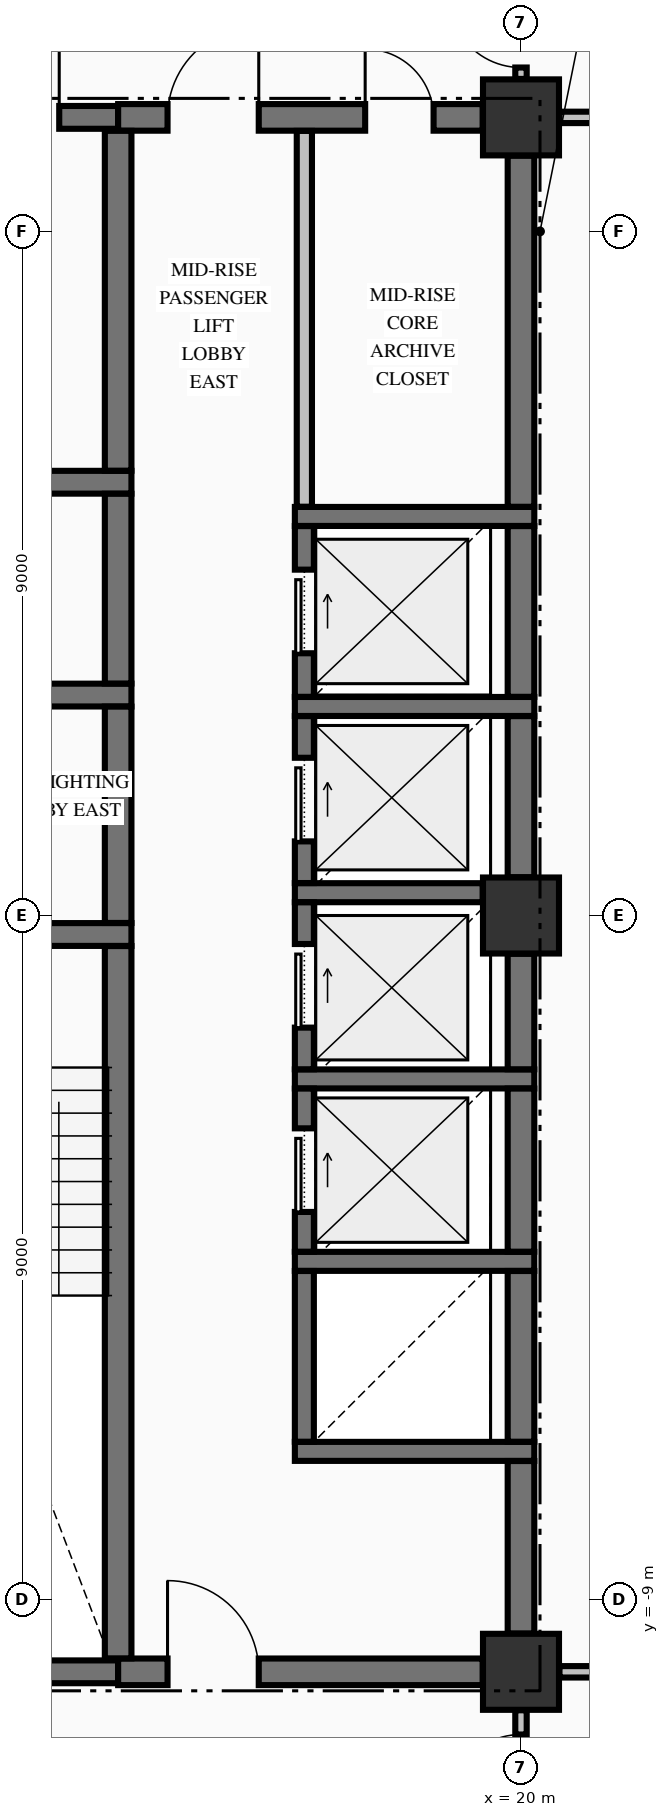
"""IFC4 building model, lengths in metres.
Left out: names, types, materials, properties, quantities, classifications, styles, units other than length and angle.
Written with IfcOpenShell. Run it as: python <this file> out.ifc"""

import sys

from ifc_helpers import new_model, si_unit, direction, frame, frame_2d, origin, origin_2d, place, context, subcontext, project, spatial, rectangle, extrude, element, fill, save


model = new_model("IFC4")
c1 = context("Model", 3, precision=1e-05, world=origin(), true_north=direction((0.0, 1.0)))
c2 = subcontext(c1, "Body", "Model", "MODEL_VIEW")
j1 = project(units=[si_unit("LENGTHUNIT", "METRE"), si_unit("PLANEANGLEUNIT", "RADIAN")], contexts=[c1])
p1 = place(None, origin())
s1 = spatial("IfcSite", under=j1, at=p1, CompositionType="ELEMENT")
p2 = place(p1, origin())
s2 = spatial("IfcBuilding", under=s1, at=p2, CompositionType="ELEMENT")
p3 = place(p2, frame((0.0, 0.0, 91.36)))
s3 = spatial("IfcBuildingStorey", under=s2, at=p3, CompositionType="ELEMENT", Elevation=91.36)
for number, where, z_axis, x_axis in (
    (1, (20.0, -9.95, -0.25), (0.0, 0.0, 1.0), (1.0, 0.0, 0.0)),
    (2, (20.0, 10.5, -0.25), (0.0, 0.0, 1.0), (1.0, 0.0, 0.0)),
    (3, (20.0, 0.0, -0.25), (0.0, 0.0, 1.0), (1.0, 0.0, 0.0)),
):
    element("IfcColumn", number, at=place(p3, frame(where, z_axis=z_axis, x_axis=x_axis)), inside=s3, PredefinedType="COLUMN", context=c2, shape_type="SweptSolid", body=[
        extrude(rectangle(XDim=1.0, YDim=1.0, at=origin_2d()), origin(), (0.0, 0.0, 1.0), 3.57),
    ])
p4 = place(p3, frame((11.504, -9.95, 0.0), z_axis=(0.0, 0.0, 1.0), x_axis=(1.0, 0.0, 0.0)))
e4 = element("IfcWall", 4, at=p4, inside=s3, PredefinedType="SHEAR", context=c2, shape_type="SweptSolid", body=[
    extrude(rectangle(XDim=3.196, YDim=0.3, at=frame_2d((1.598, 0.0))), origin(), (0.0, 0.0, 1.0), 3.32),
])
p5 = place(p3, frame((14.7, -9.95, 0.0), z_axis=(0.0, 0.0, 1.0), x_axis=(1.0, 0.0, 0.0)))
e5 = element("IfcWall", 5, at=p5, inside=s3, PredefinedType="SHEAR", context=c2, shape_type="SweptSolid", body=[
    extrude(rectangle(XDim=4.796, YDim=0.35, at=frame_2d((2.398, 0.0))), origin(), (0.0, 0.0, 1.0), 3.32),
])
p6 = place(p5, frame((0.65, 0.0, 0.0)))
e6 = element("IfcOpeningElement", 6, at=p6, cuts=e5, PredefinedType="OPENING", context=c2, shape_type="SweptSolid", body=[
    extrude(rectangle(XDim=1.2, YDim=2.15, at=frame_2d((0.6, 1.075))), frame((0.0, 0.185, 0.0), z_axis=(0.0, -1.0, 0.0), x_axis=(1.0, 0.0, 0.0)), (0.0, 0.0, 1.0), 0.37),
])
for number, where, z_axis, x_axis in (
    (7, (17.025, -7.05, 0.0), (0.0, 0.0, 1.0), (1.0, 0.0, 0.0)),
    (8, (17.025, -4.55, 0.0), (0.0, 0.0, 1.0), (1.0, 0.0, 0.0)),
    (9, (17.025, -2.15, 0.0), (0.0, 0.0, 1.0), (1.0, 0.0, 0.0)),
):
    element("IfcWall", number, at=place(p3, frame(where, z_axis=z_axis, x_axis=x_axis)), inside=s3, PredefinedType="SOLIDWALL", context=c2, shape_type="SweptSolid", body=[
        extrude(rectangle(XDim=3.15, YDim=0.25, at=frame_2d((1.575, 0.0))), origin(), (0.0, 0.0, 1.0), 3.32),
    ])
p7 = place(p3, frame((11.504, -0.25, 0.0), z_axis=(0.0, 0.0, 1.0), x_axis=(1.0, 0.0, 0.0)))
e10 = element("IfcWall", 10, at=p7, inside=s3, PredefinedType="SHEAR", context=c2, shape_type="SweptSolid", body=[
    extrude(rectangle(XDim=3.371, YDim=0.3, at=frame_2d((1.686, 0.0))), origin(), (0.0, 0.0, 1.0), 3.32),
])
p8 = place(p7, frame((1.096, 0.0, 0.0)))
e11 = element("IfcOpeningElement", 11, at=p8, cuts=e10, PredefinedType="OPENING", context=c2, shape_type="SweptSolid", body=[
    extrude(rectangle(XDim=1.1, YDim=2.15, at=frame_2d((0.55, 1.075))), frame((0.0, 0.16, 0.0), z_axis=(0.0, -1.0, 0.0), x_axis=(1.0, 0.0, 0.0)), (0.0, 0.0, 1.0), 0.32),
])
p9 = place(p3, frame((17.025, 0.3, 0.0), z_axis=(0.0, 0.0, 1.0), x_axis=(1.0, 0.0, 0.0)))
e12 = element("IfcWall", 12, at=p9, inside=s3, PredefinedType="SOLIDWALL", context=c2, shape_type="SweptSolid", body=[
    extrude(rectangle(XDim=2.471, YDim=0.25, at=frame_2d((1.236, 0.0))), origin(), (0.0, 0.0, 1.0), 3.32),
])
p10 = place(p3, frame((17.025, 2.75, 0.0), z_axis=(0.0, 0.0, 1.0), x_axis=(1.0, 0.0, 0.0)))
e13 = element("IfcWall", 13, at=p10, inside=s3, PredefinedType="SOLIDWALL", context=c2, shape_type="SweptSolid", body=[
    extrude(rectangle(XDim=3.15, YDim=0.25, at=frame_2d((1.575, 0.0))), origin(), (0.0, 0.0, 1.0), 3.32),
])
p11 = place(p3, frame((10.85, 2.9, 0.0), z_axis=(0.0, 0.0, 1.0), x_axis=(1.0, 0.0, 0.0)))
e14 = element("IfcWall", 14, at=p11, inside=s3, PredefinedType="SHEAR", context=c2, shape_type="SweptSolid", body=[
    extrude(rectangle(XDim=4.025, YDim=0.3, at=frame_2d((2.012, 0.0))), origin(), (0.0, 0.0, 1.0), 3.32),
])
p12 = place(p11, frame((0.85, 0.0, 0.0)))
e15 = element("IfcOpeningElement", 15, at=p12, cuts=e14, PredefinedType="OPENING", context=c2, shape_type="SweptSolid", body=[
    extrude(rectangle(XDim=1.1, YDim=2.2, at=frame_2d((0.55, 1.1))), frame((0.0, 0.16, 0.0), z_axis=(0.0, -1.0, 0.0), x_axis=(1.0, 0.0, 0.0)), (0.0, 0.0, 1.0), 0.32),
])
p13 = place(p3, frame((17.025, 5.25, 0.0), z_axis=(0.0, 0.0, 1.0), x_axis=(1.0, 0.0, 0.0)))
e16 = element("IfcWall", 16, at=p13, inside=s3, PredefinedType="SOLIDWALL", context=c2, shape_type="SweptSolid", body=[
    extrude(rectangle(XDim=3.15, YDim=0.25, at=frame_2d((1.575, 0.0))), origin(), (0.0, 0.0, 1.0), 3.32),
])
p14 = place(p3, frame((10.85, 5.7, 0.0), z_axis=(0.0, 0.0, 1.0), x_axis=(1.0, 0.0, 0.0)))
e17 = element("IfcWall", 17, at=p14, inside=s3, PredefinedType="SHEAR", context=c2, shape_type="SweptSolid", body=[
    extrude(rectangle(XDim=4.025, YDim=0.3, at=frame_2d((2.012, 0.0))), origin(), (0.0, 0.0, 1.0), 3.32),
])
p15 = place(p3, frame((11.504, 10.5, 0.0), z_axis=(0.0, 0.0, 1.0), x_axis=(1.0, 0.0, 0.0)))
e18 = element("IfcWall", 18, at=p15, inside=s3, PredefinedType="SHEAR", context=c2, shape_type="SweptSolid", body=[
    extrude(rectangle(XDim=3.196, YDim=0.3, at=frame_2d((1.598, 0.0))), origin(), (0.0, 0.0, 1.0), 3.32),
])
p16 = place(p15, frame((1.471, 0.0, 0.0)))
e19 = element("IfcOpeningElement", 19, at=p16, cuts=e18, PredefinedType="OPENING", context=c2, shape_type="SweptSolid", body=[
    extrude(rectangle(XDim=0.95, YDim=2.15, at=frame_2d((0.475, 1.075))), frame((0.0, 0.16, 0.0), z_axis=(0.0, -1.0, 0.0), x_axis=(1.0, 0.0, 0.0)), (0.0, 0.0, 1.0), 0.32),
])
p17 = place(p3, frame((14.7, 10.5, 0.0), z_axis=(0.0, 0.0, 1.0), x_axis=(1.0, 0.0, 0.0)))
e20 = element("IfcWall", 20, at=p17, inside=s3, PredefinedType="SHEAR", context=c2, shape_type="SweptSolid", body=[
    extrude(rectangle(XDim=4.796, YDim=0.35, at=frame_2d((2.398, 0.0))), origin(), (0.0, 0.0, 1.0), 3.32),
])
p18 = place(p17, frame((0.65, 0.0, 0.0)))
e21 = element("IfcOpeningElement", 21, at=p18, cuts=e20, PredefinedType="OPENING", context=c2, shape_type="SweptSolid", body=[
    extrude(rectangle(XDim=1.2, YDim=2.15, at=frame_2d((0.6, 1.075))), frame((0.0, 0.185, 0.0), z_axis=(0.0, -1.0, 0.0), x_axis=(1.0, 0.0, 0.0)), (0.0, 0.0, 1.0), 0.37),
])
p19 = place(p17, frame((3.25, 0.0, 0.0)))
e22 = element("IfcOpeningElement", 22, at=p19, cuts=e20, PredefinedType="OPENING", context=c2, shape_type="SweptSolid", body=[
    extrude(rectangle(XDim=0.9, YDim=2.15, at=frame_2d((0.45, 1.075))), frame((0.0, 0.185, 0.0), z_axis=(0.0, -1.0, 0.0), x_axis=(1.0, 0.0, 0.0)), (0.0, 0.0, 1.0), 0.37),
])
p20 = place(p3, frame((20.506, -9.95, 0.0), z_axis=(0.0, 0.0, 1.0), x_axis=(1.0, 0.0, 0.0)))
e23 = element("IfcWall", 23, at=p20, inside=s3, PredefinedType="PARTITIONING", context=c2, shape_type="SweptSolid", body=[
    extrude(rectangle(XDim=7.329, YDim=0.15, at=frame_2d((3.665, 0.0))), origin(), (0.0, 0.0, 1.0), 3.32),
])
p21 = place(p20, frame((2.994, 0.0, 0.0)))
e24 = element("IfcOpeningElement", 24, at=p21, cuts=e23, PredefinedType="OPENING", context=c2, shape_type="SweptSolid", body=[
    extrude(rectangle(XDim=1.0, YDim=2.15, at=frame_2d((0.5, 1.075))), frame((0.0, 0.085, 0.0), z_axis=(0.0, -1.0, 0.0), x_axis=(1.0, 0.0, 0.0)), (0.0, 0.0, 1.0), 0.17),
])
p22 = place(p3, frame((20.506, 10.5, 0.0), z_axis=(0.0, 0.0, 1.0), x_axis=(1.0, 0.0, 0.0)))
e25 = element("IfcWall", 25, at=p22, inside=s3, PredefinedType="PARTITIONING", context=c2, shape_type="SweptSolid", body=[
    extrude(rectangle(XDim=7.329, YDim=0.15, at=frame_2d((3.665, 0.0))), origin(), (0.0, 0.0, 1.0), 3.32),
])
p23 = place(p22, frame((2.994, 0.0, 0.0)))
e26 = element("IfcOpeningElement", 26, at=p23, cuts=e25, PredefinedType="OPENING", context=c2, shape_type="SweptSolid", body=[
    extrude(rectangle(XDim=1.0, YDim=2.15, at=frame_2d((0.5, 1.075))), frame((0.0, 0.085, 0.0), z_axis=(0.0, -1.0, 0.0), x_axis=(1.0, 0.0, 0.0)), (0.0, 0.0, 1.0), 0.17),
])
p24 = place(p3, frame((14.7, -9.773, 0.0), z_axis=(0.0, 0.0, 1.0), x_axis=(0.0, 1.0, 0.0)))
e27 = element("IfcWall", 27, at=p24, inside=s3, PredefinedType="SHEAR", context=c2, shape_type="SweptSolid", body=[
    extrude(rectangle(XDim=9.371, YDim=0.35, at=frame_2d((4.686, 0.0))), origin(), (0.0, 0.0, 1.0), 3.32),
])
p25 = place(p3, frame((14.7, -0.098, 0.0), z_axis=(0.0, 0.0, 1.0), x_axis=(0.0, 1.0, 0.0)))
e28 = element("IfcWall", 28, at=p25, inside=s3, PredefinedType="SHEAR", context=c2, shape_type="SweptSolid", body=[
    extrude(rectangle(XDim=2.846, YDim=0.35, at=frame_2d((1.423, 0.0))), origin(), (0.0, 0.0, 1.0), 3.32),
])
p26 = place(p3, frame((14.7, 3.052, 0.0), z_axis=(0.0, 0.0, 1.0), x_axis=(0.0, 1.0, 0.0)))
e29 = element("IfcWall", 29, at=p26, inside=s3, PredefinedType="SHEAR", context=c2, shape_type="SweptSolid", body=[
    extrude(rectangle(XDim=2.496, YDim=0.35, at=frame_2d((1.248, 0.0))), origin(), (0.0, 0.0, 1.0), 3.32),
])
p27 = place(p3, frame((14.7, 5.852, 0.0), z_axis=(0.0, 0.0, 1.0), x_axis=(0.0, 1.0, 0.0)))
e30 = element("IfcWall", 30, at=p27, inside=s3, PredefinedType="SHEAR", context=c2, shape_type="SweptSolid", body=[
    extrude(rectangle(XDim=4.471, YDim=0.35, at=frame_2d((2.235, 0.0))), origin(), (0.0, 0.0, 1.0), 3.32),
])
p28 = place(p3, frame((17.15, -6.923, 0.0), z_axis=(0.0, 0.0, 1.0), x_axis=(0.0, 1.0, 0.0)))
e31 = element("IfcWall", 31, at=p28, inside=s3, PredefinedType="SOLIDWALL", context=c2, shape_type="SweptSolid", body=[
    extrude(rectangle(XDim=2.246, YDim=0.25, at=frame_2d((1.123, 0.0))), origin(), (0.0, 0.0, 1.0), 3.32),
])
p29 = place(p3, frame((17.15, -4.423, 0.0), z_axis=(0.0, 0.0, 1.0), x_axis=(0.0, 1.0, 0.0)))
e32 = element("IfcWall", 32, at=p29, inside=s3, PredefinedType="SOLIDWALL", context=c2, shape_type="SweptSolid", body=[
    extrude(rectangle(XDim=2.146, YDim=0.25, at=frame_2d((1.073, 0.0))), origin(), (0.0, 0.0, 1.0), 3.32),
])
p30 = place(p29, frame((0.523, 0.0, 0.0)))
e33 = element("IfcOpeningElement", 33, at=p30, cuts=e32, PredefinedType="OPENING", context=c2, shape_type="SweptSolid", body=[
    extrude(rectangle(XDim=1.1, YDim=2.2, at=frame_2d((0.55, 1.1))), frame((0.0, 0.135, 0.0), z_axis=(0.0, -1.0, 0.0), x_axis=(1.0, 0.0, 0.0)), (0.0, 0.0, 1.0), 0.27),
])
p31 = place(p3, frame((17.15, -2.023, 0.0), z_axis=(0.0, 0.0, 1.0), x_axis=(0.0, 1.0, 0.0)))
e34 = element("IfcWall", 34, at=p31, inside=s3, PredefinedType="SOLIDWALL", context=c2, shape_type="SweptSolid", body=[
    extrude(rectangle(XDim=2.196, YDim=0.25, at=frame_2d((1.098, 0.0))), origin(), (0.0, 0.0, 1.0), 3.32),
])
p32 = place(p31, frame((0.548, 0.0, 0.0)))
e35 = element("IfcOpeningElement", 35, at=p32, cuts=e34, PredefinedType="OPENING", context=c2, shape_type="SweptSolid", body=[
    extrude(rectangle(XDim=1.1, YDim=2.2, at=frame_2d((0.55, 1.1))), frame((0.0, 0.135, 0.0), z_axis=(0.0, -1.0, 0.0), x_axis=(1.0, 0.0, 0.0)), (0.0, 0.0, 1.0), 0.27),
])
p33 = place(p3, frame((17.15, 0.427, 0.0), z_axis=(0.0, 0.0, 1.0), x_axis=(0.0, 1.0, 0.0)))
e36 = element("IfcWall", 36, at=p33, inside=s3, PredefinedType="SOLIDWALL", context=c2, shape_type="SweptSolid", body=[
    extrude(rectangle(XDim=2.196, YDim=0.25, at=frame_2d((1.098, 0.0))), origin(), (0.0, 0.0, 1.0), 3.32),
])
p34 = place(p33, frame((0.548, 0.0, 0.0)))
e37 = element("IfcOpeningElement", 37, at=p34, cuts=e36, PredefinedType="OPENING", context=c2, shape_type="SweptSolid", body=[
    extrude(rectangle(XDim=1.1, YDim=2.2, at=frame_2d((0.55, 1.1))), frame((0.0, 0.135, 0.0), z_axis=(0.0, -1.0, 0.0), x_axis=(1.0, 0.0, 0.0)), (0.0, 0.0, 1.0), 0.27),
])
p35 = place(p3, frame((17.15, 2.877, 0.0), z_axis=(0.0, 0.0, 1.0), x_axis=(0.0, 1.0, 0.0)))
e38 = element("IfcWall", 38, at=p35, inside=s3, PredefinedType="SOLIDWALL", context=c2, shape_type="SweptSolid", body=[
    extrude(rectangle(XDim=2.246, YDim=0.25, at=frame_2d((1.123, 0.0))), origin(), (0.0, 0.0, 1.0), 3.32),
])
p36 = place(p35, frame((0.573, 0.0, 0.0)))
e39 = element("IfcOpeningElement", 39, at=p36, cuts=e38, PredefinedType="OPENING", context=c2, shape_type="SweptSolid", body=[
    extrude(rectangle(XDim=1.1, YDim=2.2, at=frame_2d((0.55, 1.1))), frame((0.0, 0.135, 0.0), z_axis=(0.0, -1.0, 0.0), x_axis=(1.0, 0.0, 0.0)), (0.0, 0.0, 1.0), 0.27),
])
p37 = place(p3, frame((20.0, -9.446, 0.0), z_axis=(0.0, 0.0, 1.0), x_axis=(0.0, 1.0, 0.0)))
e40 = element("IfcWall", 40, at=p37, inside=s3, PredefinedType="SHEAR", context=c2, shape_type="SweptSolid", body=[
    extrude(rectangle(XDim=2.269, YDim=0.35, at=frame_2d((1.135, 0.0))), origin(), (0.0, 0.0, 1.0), 3.32),
])
p38 = place(p3, frame((20.0, -6.923, 0.0), z_axis=(0.0, 0.0, 1.0), x_axis=(0.0, 1.0, 0.0)))
e41 = element("IfcWall", 41, at=p38, inside=s3, PredefinedType="SHEAR", context=c2, shape_type="SweptSolid", body=[
    extrude(rectangle(XDim=2.246, YDim=0.35, at=frame_2d((1.123, 0.0))), origin(), (0.0, 0.0, 1.0), 3.32),
])
p39 = place(p3, frame((20.0, -4.423, 0.0), z_axis=(0.0, 0.0, 1.0), x_axis=(0.0, 1.0, 0.0)))
e42 = element("IfcWall", 42, at=p39, inside=s3, PredefinedType="SHEAR", context=c2, shape_type="SweptSolid", body=[
    extrude(rectangle(XDim=2.146, YDim=0.35, at=frame_2d((1.073, 0.0))), origin(), (0.0, 0.0, 1.0), 3.32),
])
p40 = place(p3, frame((20.0, -2.023, 0.0), z_axis=(0.0, 0.0, 1.0), x_axis=(0.0, 1.0, 0.0)))
e43 = element("IfcWall", 43, at=p40, inside=s3, PredefinedType="SHEAR", context=c2, shape_type="SweptSolid", body=[
    extrude(rectangle(XDim=1.519, YDim=0.35, at=frame_2d((0.76, 0.0))), origin(), (0.0, 0.0, 1.0), 3.32),
])
p41 = place(p3, frame((20.0, 0.504, 0.0), z_axis=(0.0, 0.0, 1.0), x_axis=(0.0, 1.0, 0.0)))
e44 = element("IfcWall", 44, at=p41, inside=s3, PredefinedType="SHEAR", context=c2, shape_type="SweptSolid", body=[
    extrude(rectangle(XDim=2.119, YDim=0.35, at=frame_2d((1.06, 0.0))), origin(), (0.0, 0.0, 1.0), 3.32),
])
p42 = place(p3, frame((20.0, 2.877, 0.0), z_axis=(0.0, 0.0, 1.0), x_axis=(0.0, 1.0, 0.0)))
e45 = element("IfcWall", 45, at=p42, inside=s3, PredefinedType="SHEAR", context=c2, shape_type="SweptSolid", body=[
    extrude(rectangle(XDim=2.246, YDim=0.35, at=frame_2d((1.123, 0.0))), origin(), (0.0, 0.0, 1.0), 3.32),
])
p43 = place(p3, frame((20.0, 5.377, 0.0), z_axis=(0.0, 0.0, 1.0), x_axis=(0.0, 1.0, 0.0)))
e46 = element("IfcWall", 46, at=p43, inside=s3, PredefinedType="SHEAR", context=c2, shape_type="SweptSolid", body=[
    extrude(rectangle(XDim=4.619, YDim=0.35, at=frame_2d((2.31, 0.0))), origin(), (0.0, 0.0, 1.0), 3.32),
])
p44 = place(p3, frame((17.15, 5.378, 0.0), z_axis=(0.0, 0.0, 1.0), x_axis=(0.0, 1.0, 0.0)))
e47 = element("IfcWall", 47, at=p44, inside=s3, PredefinedType="PARTITIONING", context=c2, shape_type="SweptSolid", body=[
    extrude(rectangle(XDim=4.944, YDim=0.2, at=frame_2d((2.472, 0.0))), origin(), (0.0, 0.0, 1.0), 3.32),
])
p45 = place(p3, frame((20.0, -12.472, 0.0), z_axis=(0.0, 0.0, 1.0), x_axis=(0.0, 1.0, 0.0)))
e48 = element("IfcWall", 48, at=p45, inside=s3, PredefinedType="PARTITIONING", context=c2, shape_type="SweptSolid", body=[
    extrude(rectangle(XDim=2.016, YDim=0.15, at=frame_2d((1.008, 0.0))), origin(), (0.0, 0.0, 1.0), 2.81),
])
p46 = place(p45, frame((0.747, 0.0, 0.0)))
e49 = element("IfcOpeningElement", 49, at=p46, cuts=e48, PredefinedType="OPENING", context=c2, shape_type="SweptSolid", body=[
    extrude(rectangle(XDim=0.95, YDim=2.15, at=frame_2d((0.475, 1.075))), frame((0.0, 0.085, 0.0), z_axis=(0.0, -1.0, 0.0), x_axis=(1.0, 0.0, 0.0)), (0.0, 0.0, 1.0), 0.17),
])
p47 = place(p3, frame((20.0, 11.006, 0.0), z_axis=(0.0, 0.0, 1.0), x_axis=(0.0, 1.0, 0.0)))
e50 = element("IfcWall", 50, at=p47, inside=s3, PredefinedType="PARTITIONING", context=c2, shape_type="SweptSolid", body=[
    extrude(rectangle(XDim=1.666, YDim=0.15, at=frame_2d((0.833, 0.0))), origin(), (0.0, 0.0, 1.0), 2.81),
])
p48 = place(p47, frame((0.15, 0.0, 0.0)))
e51 = element("IfcOpeningElement", 51, at=p48, cuts=e50, PredefinedType="OPENING", context=c2, shape_type="SweptSolid", body=[
    extrude(rectangle(XDim=0.95, YDim=2.15, at=frame_2d((0.475, 1.075))), frame((0.0, 0.085, 0.0), z_axis=(0.0, -1.0, 0.0), x_axis=(1.0, 0.0, 0.0)), (0.0, 0.0, 1.0), 0.17),
])
p49 = place(p16, origin())
e52 = element("IfcDoor", 52, at=p49, inside=s3, OperationType="SINGLE_SWING_RIGHT", PredefinedType="DOOR", context=c2, shape_type="SweptSolid", body=[
    extrude(rectangle(XDim=0.95, YDim=2.15, at=frame_2d((0.475, 1.075))), frame((0.0, 0.025, 0.0), z_axis=(0.0, -1.0, 0.0), x_axis=(1.0, 0.0, 0.0)), (0.0, 0.0, 1.0), 0.05),
])
fill(e19, e52)
p50 = place(p30, origin())
e53 = element("IfcDoor", 53, at=p50, inside=s3, OperationType="SLIDING_TO_RIGHT", PredefinedType="DOOR", context=c2, shape_type="SweptSolid", body=[
    extrude(rectangle(XDim=1.1, YDim=2.2, at=frame_2d((0.55, 1.1))), frame((0.0, 0.025, 0.0), z_axis=(0.0, -1.0, 0.0), x_axis=(1.0, 0.0, 0.0)), (0.0, 0.0, 1.0), 0.05),
])
fill(e33, e53)
p51 = place(p32, origin())
e54 = element("IfcDoor", 54, at=p51, inside=s3, OperationType="SLIDING_TO_RIGHT", PredefinedType="DOOR", context=c2, shape_type="SweptSolid", body=[
    extrude(rectangle(XDim=1.1, YDim=2.2, at=frame_2d((0.55, 1.1))), frame((0.0, 0.025, 0.0), z_axis=(0.0, -1.0, 0.0), x_axis=(1.0, 0.0, 0.0)), (0.0, 0.0, 1.0), 0.05),
])
fill(e35, e54)
p52 = place(p34, origin())
e55 = element("IfcDoor", 55, at=p52, inside=s3, OperationType="SLIDING_TO_RIGHT", PredefinedType="DOOR", context=c2, shape_type="SweptSolid", body=[
    extrude(rectangle(XDim=1.1, YDim=2.2, at=frame_2d((0.55, 1.1))), frame((0.0, 0.025, 0.0), z_axis=(0.0, -1.0, 0.0), x_axis=(1.0, 0.0, 0.0)), (0.0, 0.0, 1.0), 0.05),
])
fill(e37, e55)
p53 = place(p36, origin())
e56 = element("IfcDoor", 56, at=p53, inside=s3, OperationType="SLIDING_TO_RIGHT", PredefinedType="DOOR", context=c2, shape_type="SweptSolid", body=[
    extrude(rectangle(XDim=1.1, YDim=2.2, at=frame_2d((0.55, 1.1))), frame((0.0, 0.025, 0.0), z_axis=(0.0, -1.0, 0.0), x_axis=(1.0, 0.0, 0.0)), (0.0, 0.0, 1.0), 0.05),
])
fill(e39, e56)
p54 = place(p6, origin())
e57 = element("IfcDoor", 57, at=p54, inside=s3, OperationType="SINGLE_SWING_LEFT", PredefinedType="DOOR", context=c2, shape_type="SweptSolid", body=[
    extrude(rectangle(XDim=1.2, YDim=2.15, at=frame_2d((0.6, 1.075))), frame((0.0, 0.025, 0.0), z_axis=(0.0, -1.0, 0.0), x_axis=(1.0, 0.0, 0.0)), (0.0, 0.0, 1.0), 0.05),
])
fill(e6, e57)
p55 = place(p18, origin())
e58 = element("IfcDoor", 58, at=p55, inside=s3, OperationType="SINGLE_SWING_RIGHT", PredefinedType="DOOR", context=c2, shape_type="SweptSolid", body=[
    extrude(rectangle(XDim=1.2, YDim=2.15, at=frame_2d((0.6, 1.075))), frame((0.0, 0.025, 0.0), z_axis=(0.0, -1.0, 0.0), x_axis=(1.0, 0.0, 0.0)), (0.0, 0.0, 1.0), 0.05),
])
fill(e21, e58)
p56 = place(p19, origin())
e59 = element("IfcDoor", 59, at=p56, inside=s3, OperationType="SINGLE_SWING_LEFT", PredefinedType="DOOR", context=c2, shape_type="SweptSolid", body=[
    extrude(rectangle(XDim=0.9, YDim=2.15, at=frame_2d((0.45, 1.075))), frame((0.0, 0.025, 0.0), z_axis=(0.0, -1.0, 0.0), x_axis=(1.0, 0.0, 0.0)), (0.0, 0.0, 1.0), 0.05),
])
fill(e22, e59)
p57 = place(p48, origin())
e60 = element("IfcDoor", 60, at=p57, inside=s3, OperationType="SINGLE_SWING_RIGHT", PredefinedType="DOOR", context=c2, shape_type="SweptSolid", body=[
    extrude(rectangle(XDim=0.95, YDim=2.15, at=frame_2d((0.475, 1.075))), frame((0.0, 0.025, 0.0), z_axis=(0.0, -1.0, 0.0), x_axis=(1.0, 0.0, 0.0)), (0.0, 0.0, 1.0), 0.05),
])
fill(e51, e60)
p58 = place(p46, origin())
e61 = element("IfcDoor", 61, at=p58, inside=s3, OperationType="SINGLE_SWING_LEFT", PredefinedType="DOOR", context=c2, shape_type="SweptSolid", body=[
    extrude(rectangle(XDim=0.95, YDim=2.15, at=frame_2d((0.475, 1.075))), frame((0.0, 0.025, 0.0), z_axis=(0.0, -1.0, 0.0), x_axis=(1.0, 0.0, 0.0)), (0.0, 0.0, 1.0), 0.05),
])
fill(e49, e61)
save(model, sys.argv[1])
